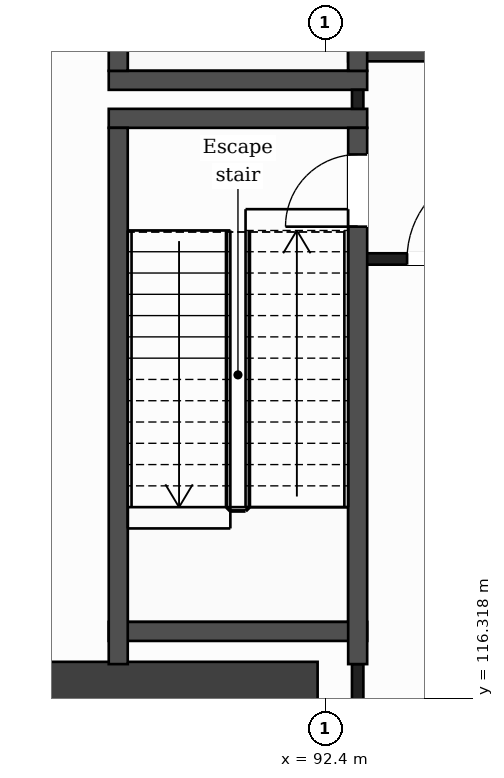
"""IFC4 building model, lengths in metres.
Left out: names, types, materials, properties, quantities, classifications, styles, units other than length and angle.
Written with IfcOpenShell. Run it as: python <this file> out.ifc"""

import sys

from ifc_helpers import new_model, si_unit, direction, frame, frame_2d, origin, place, context, subcontext, project, spatial, rectangle, extrude, element, fill, save


model = new_model("IFC4")
c1 = context("Model", 3, precision=1e-05, world=origin(), true_north=direction((0.0, 1.0)))
c2 = subcontext(c1, "Body", "Model", "MODEL_VIEW")
j1 = project(units=[si_unit("LENGTHUNIT", "METRE"), si_unit("PLANEANGLEUNIT", "RADIAN")], contexts=[c1])
p1 = place(None, origin())
s1 = spatial("IfcSite", under=j1, at=p1, CompositionType="ELEMENT")
p2 = place(p1, origin())
s2 = spatial("IfcBuilding", under=s1, at=p2, CompositionType="ELEMENT")
p3 = place(p2, frame((0.0, 0.0, 254.0)))
s3 = spatial("IfcBuildingStorey", under=s2, at=p3, CompositionType="ELEMENT", Elevation=254.0)
p4 = place(p3, frame((86.127, 110.8, 0.0), z_axis=(0.0, 0.0, 1.0), x_axis=(0.133408347329, 0.991061154956, 0.0)))
e1 = element("IfcWall", 1, at=p4, inside=s3, PredefinedType="SHEAR", context=c2, shape_type="SweptSolid", body=[
    extrude(rectangle(XDim=21.391, YDim=0.8, at=frame_2d((10.696, 0.0))), origin(), (0.0, 0.0, 1.0), 5.0),
])
p5 = place(p3, frame((87.223, 116.4, 0.0), z_axis=(0.0, 0.0, 1.0), x_axis=(1.0, 0.0, 0.0)))
e2 = element("IfcWall", 2, at=p5, inside=s3, PredefinedType="SHEAR", context=c2, shape_type="SweptSolid", body=[
    extrude(rectangle(XDim=5.077, YDim=0.8, at=frame_2d((2.539, 0.0))), origin(), (0.0, 0.0, 1.0), 5.0),
])
p6 = place(p3, frame((89.552, 117.2, 0.0), z_axis=(0.0, 0.0, 1.0), x_axis=(1.0, 0.0, 0.0)))
e3 = element("IfcWall", 3, at=p6, inside=s3, PredefinedType="PARTITIONING", context=c2, shape_type="SweptSolid", body=[
    extrude(rectangle(XDim=3.4, YDim=0.25, at=frame_2d((1.7, 0.0))), origin(), (0.0, 0.0, 1.0), 4.68),
])
p7 = place(p3, frame((92.827, 122.1, 0.0), z_axis=(0.0, 0.0, 1.0), x_axis=(1.0, 0.0, 0.0)))
e4 = element("IfcWall", 4, at=p7, inside=s3, PredefinedType="PARTITIONING", context=c2, shape_type="SweptSolid", body=[
    extrude(rectangle(XDim=2.4, YDim=0.15, at=frame_2d((1.2, 0.0))), origin(), (0.0, 0.0, 1.0), 4.68),
])
p8 = place(p7, frame((0.65, 0.0, 0.0)))
e5 = element("IfcOpeningElement", 5, at=p8, cuts=e4, PredefinedType="OPENING", context=c2, shape_type="SweptSolid", body=[
    extrude(rectangle(XDim=1.2, YDim=2.1, at=frame_2d((0.6, 1.05))), frame((0.0, 0.085, 0.0), z_axis=(0.0, -1.0, 0.0), x_axis=(1.0, 0.0, 0.0)), (0.0, 0.0, 1.0), 0.17),
])
for number, where, z_axis, x_axis in (
    (6, (89.552, 123.95, 0.0), (0.0, 0.0, 1.0), (1.0, 0.0, 0.0)),
    (7, (89.552, 124.45, 0.0), (0.0, 0.0, 1.0), (1.0, 0.0, 0.0)),
):
    element("IfcWall", number, at=place(p3, frame(where, z_axis=z_axis, x_axis=x_axis)), inside=s3, PredefinedType="PARTITIONING", context=c2, shape_type="SweptSolid", body=[
        extrude(rectangle(XDim=3.4, YDim=0.25, at=frame_2d((1.7, 0.0))), origin(), (0.0, 0.0, 1.0), 4.68),
    ])
p9 = place(p3, frame((92.702, 124.8, 0.0), z_axis=(0.0, 0.0, 1.0), x_axis=(1.0, 0.0, 0.0)))
e8 = element("IfcWall", 8, at=p9, inside=s3, PredefinedType="PARTITIONING", context=c2, shape_type="SweptSolid", body=[
    extrude(rectangle(XDim=7.298, YDim=0.2, at=frame_2d((3.649, 0.0))), origin(), (0.0, 0.0, 1.0), 4.68),
])
p10 = place(p9, frame((5.405, 0.0, 0.0)))
e9 = element("IfcOpeningElement", 9, at=p10, cuts=e8, PredefinedType="OPENING", context=c2, shape_type="SweptSolid", body=[
    extrude(rectangle(XDim=1.1, YDim=2.1, at=frame_2d((0.55, 1.05))), frame((0.0, 0.11, 0.0), z_axis=(0.0, -1.0, 0.0), x_axis=(1.0, 0.0, 0.0)), (0.0, 0.0, 1.0), 0.22),
])
for number, where, z_axis, x_axis in (
    (10, (89.677, 116.77, 0.0), (0.0, 0.0, 1.0), (0.0, 1.0, 0.0)),
    (11, (89.677, 124.575, 0.0), (0.0, 0.0, 1.0), (0.0, 1.0, 0.0)),
):
    element("IfcWall", number, at=place(p3, frame(where, z_axis=z_axis, x_axis=x_axis)), inside=s3, PredefinedType="PARTITIONING", context=c2, shape_type="SweptSolid", body=[
        extrude(rectangle(XDim=7.055, YDim=0.25, at=frame_2d((3.527, 0.0))), origin(), (0.0, 0.0, 1.0), 4.68),
    ])
p11 = place(p3, frame((92.827, 116.0, 0.0), z_axis=(0.0, 0.0, 1.0), x_axis=(0.0, 1.0, 0.0)))
e12 = element("IfcWall", 12, at=p11, inside=s3, PredefinedType="PARTITIONING", context=c2, shape_type="SweptSolid", body=[
    extrude(rectangle(XDim=0.77, YDim=0.15, at=frame_2d((0.385, 0.0))), origin(), (0.0, 0.0, 1.0), 4.68),
])
p12 = place(p3, frame((92.827, 124.075, 0.0), z_axis=(0.0, 0.0, 1.0), x_axis=(0.0, 1.0, 0.0)))
e13 = element("IfcWall", 13, at=p12, inside=s3, PredefinedType="PARTITIONING", context=c2, shape_type="SweptSolid", body=[
    extrude(rectangle(XDim=0.25, YDim=0.15, at=frame_2d((0.125, 0.0))), origin(), (0.0, 0.0, 1.0), 4.68),
])
p13 = place(p3, frame((92.827, 116.77, 0.0), z_axis=(0.0, 0.0, 1.0), x_axis=(0.0, 1.0, 0.0)))
e14 = element("IfcWall", 14, at=p13, inside=s3, PredefinedType="PARTITIONING", context=c2, shape_type="SweptSolid", body=[
    extrude(rectangle(XDim=7.055, YDim=0.25, at=frame_2d((3.527, 0.0))), origin(), (0.0, 0.0, 1.0), 4.68),
])
p14 = place(p13, frame((5.755, 0.0, 0.0)))
e15 = element("IfcOpeningElement", 15, at=p14, cuts=e14, PredefinedType="OPENING", context=c2, shape_type="SweptSolid", body=[
    extrude(rectangle(XDim=0.95, YDim=2.1, at=frame_2d((0.475, 1.05))), frame((0.0, 0.135, 0.0), z_axis=(0.0, -1.0, 0.0), x_axis=(1.0, 0.0, 0.0)), (0.0, 0.0, 1.0), 0.27),
])
p15 = place(p3, frame((92.827, 124.575, 0.0), z_axis=(0.0, 0.0, 1.0), x_axis=(0.0, 1.0, 0.0)))
e16 = element("IfcWall", 16, at=p15, inside=s3, PredefinedType="PARTITIONING", context=c2, shape_type="SweptSolid", body=[
    extrude(rectangle(XDim=7.055, YDim=0.25, at=frame_2d((3.527, 0.0))), origin(), (0.0, 0.0, 1.0), 4.68),
])
p16 = place(p15, frame((5.325, 0.0, 0.0)))
e17 = element("IfcOpeningElement", 17, at=p16, cuts=e16, PredefinedType="OPENING", context=c2, shape_type="SweptSolid", body=[
    extrude(rectangle(XDim=1.0, YDim=2.1, at=frame_2d((0.5, 1.05))), frame((0.0, 0.135, 0.0), z_axis=(0.0, -1.0, 0.0), x_axis=(1.0, 0.0, 0.0)), (0.0, 0.0, 1.0), 0.27),
])
p17 = place(p8, origin())
e18 = element("IfcDoor", 18, at=p17, inside=s3, OperationType="SINGLE_SWING_RIGHT", PredefinedType="DOOR", context=c2, shape_type="SweptSolid", body=[
    extrude(rectangle(XDim=1.2, YDim=2.1, at=frame_2d((0.6, 1.05))), frame((0.0, 0.025, 0.0), z_axis=(0.0, -1.0, 0.0), x_axis=(1.0, 0.0, 0.0)), (0.0, 0.0, 1.0), 0.05),
])
fill(e5, e18)
p18 = place(p14, origin())
e19 = element("IfcDoor", 19, at=p18, inside=s3, OperationType="SINGLE_SWING_LEFT", PredefinedType="DOOR", context=c2, shape_type="SweptSolid", body=[
    extrude(rectangle(XDim=0.95, YDim=2.1, at=frame_2d((0.475, 1.05))), frame((0.0, 0.025, 0.0), z_axis=(0.0, -1.0, 0.0), x_axis=(1.0, 0.0, 0.0)), (0.0, 0.0, 1.0), 0.05),
])
fill(e15, e19)
save(model, sys.argv[1])
